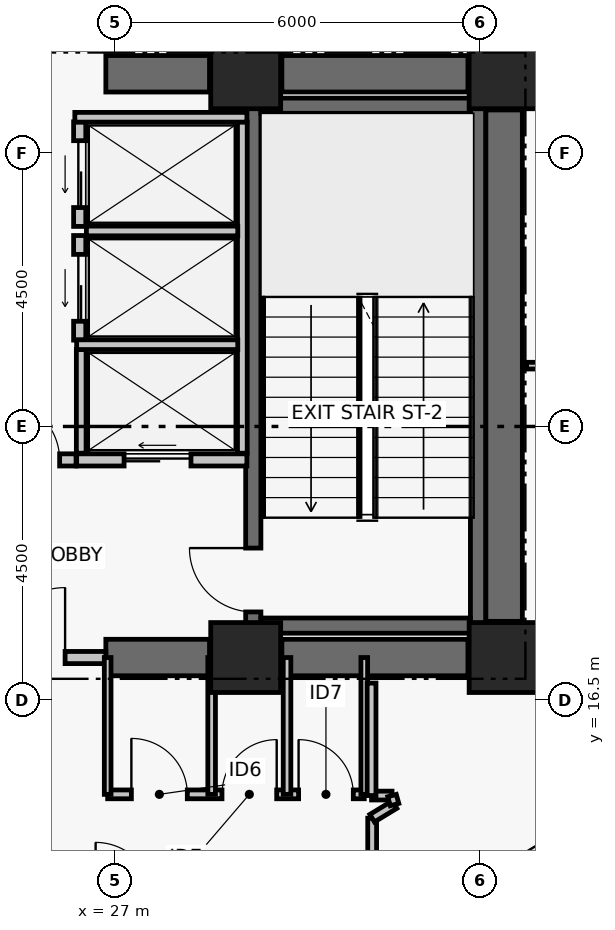
"""IFC4 building model, lengths in metres.
Left out: names, types, materials, properties, quantities, classifications, styles, units other than length and angle.
Written with IfcOpenShell. Run it as: python <this file> out.ifc"""

import sys

from ifc_helpers import new_model, si_unit, direction, frame, frame_2d, origin, origin_2d, place, context, subcontext, project, spatial, rectangle, extrude, element, fill, save


model = new_model("IFC4")
c1 = context("Model", 3, precision=1e-05, world=origin(), true_north=direction((0.0, 1.0)))
c2 = subcontext(c1, "Body", "Model", "MODEL_VIEW")
j1 = project(units=[si_unit("LENGTHUNIT", "METRE"), si_unit("PLANEANGLEUNIT", "RADIAN")], contexts=[c1])
p1 = place(None, origin())
s1 = spatial("IfcSite", under=j1, at=p1, CompositionType="ELEMENT")
p2 = place(p1, origin())
s2 = spatial("IfcBuilding", under=s1, at=p2, CompositionType="ELEMENT")
p3 = place(p2, frame((0.0, 0.0, 27.6)))
s3 = spatial("IfcBuildingStorey", under=s2, at=p3, CompositionType="ELEMENT", Elevation=27.6)
for number, where, z_axis, x_axis in (
    (1, (29.15, 17.2, 0.0), (0.0, 0.0, 1.0), (1.0, 0.0, 0.0)),
    (2, (33.4, 17.2, 0.0), (0.0, 0.0, 1.0), (1.0, 0.0, 0.0)),
    (3, (29.15, 26.8, 0.0), (0.0, 0.0, 1.0), (1.0, 0.0, 0.0)),
    (4, (33.4, 26.8, 0.0), (0.0, 0.0, 1.0), (1.0, 0.0, 0.0)),
):
    element("IfcColumn", number, at=place(p3, frame(where, z_axis=z_axis, x_axis=x_axis)), inside=s3, PredefinedType="COLUMN", context=c2, shape_type="SweptSolid", body=[
        extrude(rectangle(XDim=1.15, YDim=1.15, at=origin_2d()), origin(), (0.0, 0.0, 1.0), 3.72),
    ])
p4 = place(p3, frame((26.85, 17.2, 0.0), z_axis=(0.0, 0.0, 1.0), x_axis=(1.0, 0.0, 0.0)))
e5 = element("IfcWall", 5, at=p4, inside=s3, PredefinedType="SHEAR", context=c2, shape_type="SweptSolid", body=[
    extrude(rectangle(XDim=1.705, YDim=0.6, at=frame_2d((0.853, 0.0))), origin(), (0.0, 0.0, 1.0), 3.47),
])
p5 = place(p3, frame((29.745, 17.2, 0.0), z_axis=(0.0, 0.0, 1.0), x_axis=(1.0, 0.0, 0.0)))
e6 = element("IfcWall", 6, at=p5, inside=s3, PredefinedType="SHEAR", context=c2, shape_type="SweptSolid", body=[
    extrude(rectangle(XDim=3.06, YDim=0.6, at=frame_2d((1.53, 0.0))), origin(), (0.0, 0.0, 1.0), 3.47),
])
p6 = place(p3, frame((26.85, 26.8, 0.0), z_axis=(0.0, 0.0, 1.0), x_axis=(1.0, 0.0, 0.0)))
e7 = element("IfcWall", 7, at=p6, inside=s3, PredefinedType="SHEAR", context=c2, shape_type="SweptSolid", body=[
    extrude(rectangle(XDim=1.705, YDim=0.6, at=frame_2d((0.853, 0.0))), origin(), (0.0, 0.0, 1.0), 3.47),
])
p7 = place(p3, frame((29.745, 26.8, 0.0), z_axis=(0.0, 0.0, 1.0), x_axis=(1.0, 0.0, 0.0)))
e8 = element("IfcWall", 8, at=p7, inside=s3, PredefinedType="SHEAR", context=c2, shape_type="SweptSolid", body=[
    extrude(rectangle(XDim=3.06, YDim=0.6, at=frame_2d((1.53, 0.0))), origin(), (0.0, 0.0, 1.0), 3.47),
])
p8 = place(p3, frame((33.4, 17.795, 0.0), z_axis=(0.0, 0.0, 1.0), x_axis=(0.0, 1.0, 0.0)))
e9 = element("IfcWall", 9, at=p8, inside=s3, PredefinedType="SHEAR", context=c2, shape_type="SweptSolid", body=[
    extrude(rectangle(XDim=8.41, YDim=0.6, at=frame_2d((4.205, 0.0))), origin(), (0.0, 0.0, 1.0), 3.47),
])
p9 = place(p3, frame((29.275, 17.6, 0.0), z_axis=(0.0, 0.0, 1.0), x_axis=(0.0, 1.0, 0.0)))
e10 = element("IfcWall", 10, at=p9, inside=s3, PredefinedType="SHEAR", context=c2, shape_type="SweptSolid", body=[
    extrude(rectangle(XDim=8.8, YDim=0.25, at=frame_2d((4.4, 0.0))), origin(), (0.0, 0.0, 1.0), 3.47),
])
p10 = place(p9, frame((0.35, 0.0, 0.0)))
e11 = element("IfcOpeningElement", 11, at=p10, cuts=e10, PredefinedType="OPENING", context=c2, shape_type="SweptSolid", body=[
    extrude(rectangle(XDim=1.05, YDim=2.08, at=frame_2d((0.525, 1.04))), frame((0.0, 0.135, 0.0), z_axis=(0.0, -1.0, 0.0), x_axis=(1.0, 0.0, 0.0)), (0.0, 0.0, 1.0), 0.27),
])
p11 = place(p3, frame((32.971, 17.6, 0.0), z_axis=(0.0, 0.0, 1.0), x_axis=(0.0, 1.0, 0.0)))
e12 = element("IfcWall", 12, at=p11, inside=s3, PredefinedType="SHEAR", context=c2, shape_type="SweptSolid", body=[
    extrude(rectangle(XDim=8.8, YDim=0.25, at=frame_2d((4.4, 0.0))), origin(), (0.0, 0.0, 1.0), 3.47),
])
for number, where, z_axis, x_axis in (
    (13, (29.4, 17.725, 0.0), (0.0, 0.0, 1.0), (1.0, 0.0, 0.0)),
    (14, (29.4, 26.275, 0.0), (0.0, 0.0, 1.0), (1.0, 0.0, 0.0)),
):
    element("IfcWall", number, at=place(p3, frame(where, z_axis=z_axis, x_axis=x_axis)), inside=s3, PredefinedType="SHEAR", context=c2, shape_type="SweptSolid", body=[
        extrude(rectangle(XDim=3.446, YDim=0.25, at=frame_2d((1.723, 0.0))), origin(), (0.0, 0.0, 1.0), 3.47),
    ])
p12 = place(p3, frame((24.35, 17.2, 0.0), z_axis=(0.0, 0.0, 1.0), x_axis=(1.0, 0.0, 0.0)))
e15 = element("IfcWall", 15, at=p12, inside=s3, PredefinedType="PARTITIONING", context=c2, shape_type="SweptSolid", body=[
    extrude(rectangle(XDim=2.5, YDim=0.2, at=frame_2d((1.25, 0.0))), origin(), (0.0, 0.0, 1.0), 2.6),
])
p13 = place(p12, frame((0.68, 0.0, 0.0)))
e16 = element("IfcOpeningElement", 16, at=p13, cuts=e15, PredefinedType="OPENING", context=c2, shape_type="SweptSolid", body=[
    extrude(rectangle(XDim=1.15, YDim=2.08, at=frame_2d((0.575, 1.04))), frame((0.0, 0.11, 0.0), z_axis=(0.0, -1.0, 0.0), x_axis=(1.0, 0.0, 0.0)), (0.0, 0.0, 1.0), 0.22),
])
p14 = place(p3, frame((24.84, 20.45, 0.0), z_axis=(0.0, 0.0, 1.0), x_axis=(1.0, 0.0, 0.0)))
e17 = element("IfcWall", 17, at=p14, inside=s3, PredefinedType="PARTITIONING", context=c2, shape_type="SweptSolid", body=[
    extrude(rectangle(XDim=1.52, YDim=0.2, at=frame_2d((0.76, 0.0))), origin(), (0.0, 0.0, 1.0), 3.47),
])
p15 = place(p14, frame((0.27, 0.0, 0.0)))
e18 = element("IfcOpeningElement", 18, at=p15, cuts=e17, PredefinedType="OPENING", context=c2, shape_type="SweptSolid", body=[
    extrude(rectangle(XDim=0.98, YDim=2.06, at=frame_2d((0.49, 1.03))), frame((0.0, 0.11, 0.0), z_axis=(0.0, -1.0, 0.0), x_axis=(1.0, 0.0, 0.0)), (0.0, 0.0, 1.0), 0.22),
])
p16 = place(p3, frame((26.37, 20.45, 0.0), z_axis=(0.0, 0.0, 1.0), x_axis=(1.0, 0.0, 0.0)))
e19 = element("IfcWall", 19, at=p16, inside=s3, PredefinedType="PARTITIONING", context=c2, shape_type="SweptSolid", body=[
    extrude(rectangle(XDim=2.8, YDim=0.2, at=frame_2d((1.4, 0.0))), origin(), (0.0, 0.0, 1.0), 3.47),
])
p17 = place(p16, frame((0.78, 0.0, 0.0)))
e20 = element("IfcOpeningElement", 20, at=p17, cuts=e19, PredefinedType="OPENING", context=c2, shape_type="SweptSolid", body=[
    extrude(rectangle(XDim=1.1, YDim=2.08, at=frame_2d((0.55, 1.04))), frame((0.0, 0.11, 0.0), z_axis=(0.0, -1.0, 0.0), x_axis=(1.0, 0.0, 0.0)), (0.0, 0.0, 1.0), 0.22),
])
p18 = place(p3, frame((26.42, 22.42, 0.0), z_axis=(0.0, 0.0, 1.0), x_axis=(0.0, 1.0, 0.0)))
e21 = element("IfcWall", 21, at=p18, inside=s3, PredefinedType="PARTITIONING", context=c2, shape_type="SweptSolid", body=[
    extrude(rectangle(XDim=1.72, YDim=0.2, at=frame_2d((0.86, 0.0))), origin(), (0.0, 0.0, 1.0), 3.47),
])
p19 = place(p18, frame((0.31, 0.0, 0.0)))
e22 = element("IfcOpeningElement", 22, at=p19, cuts=e21, PredefinedType="OPENING", context=c2, shape_type="SweptSolid", body=[
    extrude(rectangle(XDim=1.1, YDim=2.08, at=frame_2d((0.55, 1.04))), frame((0.0, 0.11, 0.0), z_axis=(0.0, -1.0, 0.0), x_axis=(1.0, 0.0, 0.0)), (0.0, 0.0, 1.0), 0.22),
])
p20 = place(p3, frame((26.42, 24.29, 0.0), z_axis=(0.0, 0.0, 1.0), x_axis=(0.0, 1.0, 0.0)))
e23 = element("IfcWall", 23, at=p20, inside=s3, PredefinedType="PARTITIONING", context=c2, shape_type="SweptSolid", body=[
    extrude(rectangle(XDim=1.72, YDim=0.2, at=frame_2d((0.86, 0.0))), origin(), (0.0, 0.0, 1.0), 3.47),
])
p21 = place(p20, frame((0.31, 0.0, 0.0)))
e24 = element("IfcOpeningElement", 24, at=p21, cuts=e23, PredefinedType="OPENING", context=c2, shape_type="SweptSolid", body=[
    extrude(rectangle(XDim=1.1, YDim=2.08, at=frame_2d((0.55, 1.04))), frame((0.0, 0.11, 0.0), z_axis=(0.0, -1.0, 0.0), x_axis=(1.0, 0.0, 0.0)), (0.0, 0.0, 1.0), 0.22),
])
p22 = place(p3, frame((29.095, 20.56, 0.0), z_axis=(0.0, 0.0, 1.0), x_axis=(0.0, 1.0, 0.0)))
e25 = element("IfcWall", 25, at=p22, inside=s3, PredefinedType="PARTITIONING", context=c2, shape_type="SweptSolid", body=[
    extrude(rectangle(XDim=5.45, YDim=0.16, at=frame_2d((2.725, 0.0))), origin(), (0.0, 0.0, 1.0), 3.47),
])
p23 = place(p3, frame((26.445, 20.56, 0.0), z_axis=(0.0, 0.0, 1.0), x_axis=(0.0, 1.0, 0.0)))
e26 = element("IfcWall", 26, at=p23, inside=s3, PredefinedType="PARTITIONING", context=c2, shape_type="SweptSolid", body=[
    extrude(rectangle(XDim=1.71, YDim=0.16, at=frame_2d((0.855, 0.0))), origin(), (0.0, 0.0, 1.0), 3.47),
])
p24 = place(p3, frame((26.37, 22.345, 0.0), z_axis=(0.0, 0.0, 1.0), x_axis=(1.0, 0.0, 0.0)))
e27 = element("IfcWall", 27, at=p24, inside=s3, PredefinedType="PARTITIONING", context=c2, shape_type="SweptSolid", body=[
    extrude(rectangle(XDim=2.65, YDim=0.16, at=frame_2d((1.325, 0.0))), origin(), (0.0, 0.0, 1.0), 3.47),
])
p25 = place(p3, frame((26.53, 24.215, 0.0), z_axis=(0.0, 0.0, 1.0), x_axis=(1.0, 0.0, 0.0)))
e28 = element("IfcWall", 28, at=p25, inside=s3, PredefinedType="PARTITIONING", context=c2, shape_type="SweptSolid", body=[
    extrude(rectangle(XDim=2.49, YDim=0.16, at=frame_2d((1.245, 0.0))), origin(), (0.0, 0.0, 1.0), 3.47),
])
p26 = place(p3, frame((26.34, 26.085, 0.0), z_axis=(0.0, 0.0, 1.0), x_axis=(1.0, 0.0, 0.0)))
e29 = element("IfcWall", 29, at=p26, inside=s3, PredefinedType="PARTITIONING", context=c2, shape_type="SweptSolid", body=[
    extrude(rectangle(XDim=2.83, YDim=0.16, at=frame_2d((1.415, 0.0))), origin(), (0.0, 0.0, 1.0), 3.47),
])
p27 = place(p3, frame((26.88, 14.95, 0.0), z_axis=(0.0, 0.0, 1.0), x_axis=(1.0, 0.0, 0.0)))
e30 = element("IfcWall", 30, at=p27, inside=s3, PredefinedType="PARTITIONING", context=c2, shape_type="SweptSolid", body=[
    extrude(rectangle(XDim=4.22, YDim=0.145, at=frame_2d((2.11, 0.0))), origin(), (0.0, 0.0, 1.0), 3.0),
])
p28 = place(p27, frame((0.39, 0.0, 0.0)))
e31 = element("IfcOpeningElement", 31, at=p28, cuts=e30, PredefinedType="OPENING", context=c2, shape_type="SweptSolid", body=[
    extrude(rectangle(XDim=0.92, YDim=2.05, at=frame_2d((0.46, 1.025))), frame((0.0, 0.083, 0.0), z_axis=(0.0, -1.0, 0.0), x_axis=(1.0, 0.0, 0.0)), (0.0, 0.0, 1.0), 0.165),
])
p29 = place(p27, frame((1.88, 0.0, 0.0)))
e32 = element("IfcOpeningElement", 32, at=p29, cuts=e30, PredefinedType="OPENING", context=c2, shape_type="SweptSolid", body=[
    extrude(rectangle(XDim=0.9, YDim=2.02, at=frame_2d((0.45, 1.01))), frame((0.0, 0.083, 0.0), z_axis=(0.0, -1.0, 0.0), x_axis=(1.0, 0.0, 0.0)), (0.0, 0.0, 1.0), 0.165),
])
p30 = place(p27, frame((3.14, 0.0, 0.0)))
e33 = element("IfcOpeningElement", 33, at=p30, cuts=e30, PredefinedType="OPENING", context=c2, shape_type="SweptSolid", body=[
    extrude(rectangle(XDim=0.9, YDim=2.02, at=frame_2d((0.45, 1.01))), frame((0.0, 0.083, 0.0), z_axis=(0.0, -1.0, 0.0), x_axis=(1.0, 0.0, 0.0)), (0.0, 0.0, 1.0), 0.165),
])
p31 = place(p3, frame((26.88, 14.95, 0.0), z_axis=(0.0, 0.0, 1.0), x_axis=(0.0, 1.0, 0.0)))
e34 = element("IfcWall", 34, at=p31, inside=s3, PredefinedType="PARTITIONING", context=c2, shape_type="SweptSolid", body=[
    extrude(rectangle(XDim=2.25, YDim=0.11, at=frame_2d((1.125, 0.0))), origin(), (0.0, 0.0, 1.0), 2.6),
])
for number, where, z_axis, x_axis in (
    (35, (28.59, 14.95, 0.0), (0.0, 0.0, 1.0), (0.0, 1.0, 0.0)),
    (36, (29.83, 14.95, 0.0), (0.0, 0.0, 1.0), (0.0, 1.0, 0.0)),
):
    element("IfcWall", number, at=place(p3, frame(where, z_axis=z_axis, x_axis=x_axis)), inside=s3, PredefinedType="PARTITIONING", context=c2, shape_type="SweptSolid", body=[
        extrude(rectangle(XDim=2.25, YDim=0.125, at=frame_2d((1.125, 0.0))), origin(), (0.0, 0.0, 1.0), 2.6),
    ])
p32 = place(p3, frame((31.1, 14.95, 0.0), z_axis=(0.0, 0.0, 1.0), x_axis=(0.0, 1.0, 0.0)))
e37 = element("IfcWall", 37, at=p32, inside=s3, PredefinedType="PARTITIONING", context=c2, shape_type="SweptSolid", body=[
    extrude(rectangle(XDim=2.25, YDim=0.11, at=frame_2d((1.125, 0.0))), origin(), (0.0, 0.0, 1.0), 2.6),
])
p33 = place(p3, frame((31.23, 13.29, 0.0), z_axis=(0.0, 0.0, 1.0), x_axis=(0.0, 1.0, 0.0)))
e38 = element("IfcWall", 38, at=p33, inside=s3, PredefinedType="PARTITIONING", context=c2, shape_type="SweptSolid", body=[
    extrude(rectangle(XDim=1.268, YDim=0.145, at=frame_2d((0.634, 0.0))), origin(), (0.0, 0.0, 1.0), 2.85),
])
p34 = place(p3, frame((31.23, 14.558, 0.0), z_axis=(0.0, 0.0, 1.0), x_axis=(0.854931196424, 0.518741408971, 0.0)))
e39 = element("IfcWall", 39, at=p34, inside=s3, PredefinedType="PARTITIONING", context=c2, shape_type="SweptSolid", body=[
    extrude(rectangle(XDim=0.431, YDim=0.145, at=frame_2d((0.215, 0.0))), origin(), (0.0, 0.0, 1.0), 3.0),
])
p35 = place(p3, frame((31.557, 14.93, 0.0), z_axis=(0.0, 0.0, 1.0), x_axis=(-1.0, 0.0, 0.0)))
e40 = element("IfcWall", 40, at=p35, inside=s3, PredefinedType="PARTITIONING", context=c2, shape_type="SweptSolid", body=[
    extrude(rectangle(XDim=0.337, YDim=0.145, at=frame_2d((0.168, 0.0))), origin(), (0.0, 0.0, 1.0), 3.0),
])
p36 = place(p3, frame((31.22, 14.93, 0.0), z_axis=(0.0, 0.0, 1.0), x_axis=(0.0, 1.0, 0.0)))
e41 = element("IfcWall", 41, at=p36, inside=s3, PredefinedType="PARTITIONING", context=c2, shape_type="SweptSolid", body=[
    extrude(rectangle(XDim=1.85, YDim=0.145, at=frame_2d((0.925, 0.0))), origin(), (0.0, 0.0, 1.0), 2.6),
])
p37 = place(p3, frame((33.74, 27.22, 0.0), z_axis=(0.0, 0.0, 1.0), x_axis=(-1.0, 0.0, 0.0)))
e42 = element("IfcWall", 42, at=p37, inside=s3, PredefinedType="PARTITIONING", context=c2, shape_type="SweptSolid", body=[
    extrude(rectangle(XDim=0.86, YDim=0.145, at=frame_2d((0.43, 0.0))), origin(), (0.0, 0.0, 1.0), 2.6),
])
p38 = place(p3, frame((33.77, 22.0, 0.0), z_axis=(0.0, 0.0, 1.0), x_axis=(1.0, 0.0, 0.0)))
e43 = element("IfcWall", 43, at=p38, inside=s3, PredefinedType="PARTITIONING", context=c2, shape_type="SweptSolid", body=[
    extrude(rectangle(XDim=9.755, YDim=0.11, at=frame_2d((4.877, 0.0))), origin(), (0.0, 0.0, 1.0), 2.6),
])
p39 = place(p3, frame((31.598, 14.781, 0.0), z_axis=(0.0, 0.0, 1.0), x_axis=(-0.269277388617, 0.963062660464, 0.0)))
e44 = element("IfcWall", 44, at=p39, inside=s3, PredefinedType="PARTITIONING", context=c2, shape_type="SweptSolid", body=[
    extrude(rectangle(XDim=0.154, YDim=0.145, at=frame_2d((0.077, 0.0))), origin(), (0.0, 0.0, 1.0), 3.0),
])
p40 = place(p10, origin())
e45 = element("IfcDoor", 45, at=p40, inside=s3, OperationType="SINGLE_SWING_RIGHT", PredefinedType="DOOR", context=c2, shape_type="SweptSolid", body=[
    extrude(rectangle(XDim=1.05, YDim=2.08, at=frame_2d((0.525, 1.04))), frame((0.0, 0.025, 0.0), z_axis=(0.0, -1.0, 0.0), x_axis=(1.0, 0.0, 0.0)), (0.0, 0.0, 1.0), 0.05),
])
fill(e11, e45)
p41 = place(p13, origin())
e46 = element("IfcDoor", 46, at=p41, inside=s3, OperationType="SINGLE_SWING_RIGHT", PredefinedType="DOOR", context=c2, shape_type="SweptSolid", body=[
    extrude(rectangle(XDim=1.15, YDim=2.08, at=frame_2d((0.575, 1.04))), frame((0.0, 0.025, 0.0), z_axis=(0.0, -1.0, 0.0), x_axis=(1.0, 0.0, 0.0)), (0.0, 0.0, 1.0), 0.05),
])
fill(e16, e46)
p42 = place(p15, origin())
e47 = element("IfcDoor", 47, at=p42, inside=s3, OperationType="SINGLE_SWING_LEFT", PredefinedType="DOOR", context=c2, shape_type="SweptSolid", body=[
    extrude(rectangle(XDim=0.98, YDim=2.06, at=frame_2d((0.49, 1.03))), frame((0.0, 0.025, 0.0), z_axis=(0.0, -1.0, 0.0), x_axis=(1.0, 0.0, 0.0)), (0.0, 0.0, 1.0), 0.05),
])
fill(e18, e47)
p43 = place(p17, origin())
e48 = element("IfcDoor", 48, at=p43, inside=s3, OperationType="DOUBLE_DOOR_SLIDING", PredefinedType="DOOR", context=c2, shape_type="SweptSolid", body=[
    extrude(rectangle(XDim=1.1, YDim=2.08, at=frame_2d((0.55, 1.04))), frame((0.0, 0.025, 0.0), z_axis=(0.0, -1.0, 0.0), x_axis=(1.0, 0.0, 0.0)), (0.0, 0.0, 1.0), 0.05),
])
fill(e20, e48)
p44 = place(p19, origin())
e49 = element("IfcDoor", 49, at=p44, inside=s3, OperationType="DOUBLE_DOOR_SLIDING", PredefinedType="DOOR", context=c2, shape_type="SweptSolid", body=[
    extrude(rectangle(XDim=1.1, YDim=2.08, at=frame_2d((0.55, 1.04))), frame((0.0, 0.025, 0.0), z_axis=(0.0, -1.0, 0.0), x_axis=(1.0, 0.0, 0.0)), (0.0, 0.0, 1.0), 0.05),
])
fill(e22, e49)
p45 = place(p21, origin())
e50 = element("IfcDoor", 50, at=p45, inside=s3, OperationType="DOUBLE_DOOR_SLIDING", PredefinedType="DOOR", context=c2, shape_type="SweptSolid", body=[
    extrude(rectangle(XDim=1.1, YDim=2.08, at=frame_2d((0.55, 1.04))), frame((0.0, 0.025, 0.0), z_axis=(0.0, -1.0, 0.0), x_axis=(1.0, 0.0, 0.0)), (0.0, 0.0, 1.0), 0.05),
])
fill(e24, e50)
p46 = place(p28, origin())
e51 = element("IfcDoor", 51, at=p46, inside=s3, OperationType="SINGLE_SWING_LEFT", PredefinedType="DOOR", context=c2, shape_type="SweptSolid", body=[
    extrude(rectangle(XDim=0.92, YDim=2.05, at=frame_2d((0.46, 1.025))), frame((0.0, 0.025, 0.0), z_axis=(0.0, -1.0, 0.0), x_axis=(1.0, 0.0, 0.0)), (0.0, 0.0, 1.0), 0.05),
])
fill(e31, e51)
p47 = place(p29, origin())
e52 = element("IfcDoor", 52, at=p47, inside=s3, OperationType="SINGLE_SWING_RIGHT", PredefinedType="DOOR", context=c2, shape_type="SweptSolid", body=[
    extrude(rectangle(XDim=0.9, YDim=2.02, at=frame_2d((0.45, 1.01))), frame((0.0, 0.025, 0.0), z_axis=(0.0, -1.0, 0.0), x_axis=(1.0, 0.0, 0.0)), (0.0, 0.0, 1.0), 0.05),
])
fill(e32, e52)
p48 = place(p30, origin())
e53 = element("IfcDoor", 53, at=p48, inside=s3, OperationType="SINGLE_SWING_LEFT", PredefinedType="DOOR", context=c2, shape_type="SweptSolid", body=[
    extrude(rectangle(XDim=0.9, YDim=2.02, at=frame_2d((0.45, 1.01))), frame((0.0, 0.025, 0.0), z_axis=(0.0, -1.0, 0.0), x_axis=(1.0, 0.0, 0.0)), (0.0, 0.0, 1.0), 0.05),
])
fill(e33, e53)
save(model, sys.argv[1])
